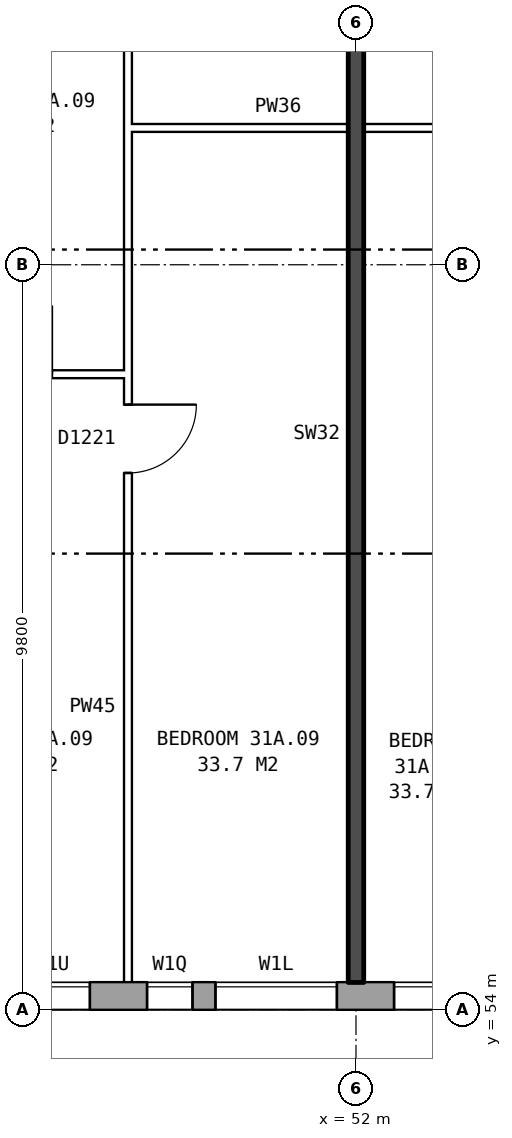
"""IFC4 building model, lengths in metres.
Left out: names, types, materials, properties, quantities, classifications, styles, units other than length and angle.
Written with IfcOpenShell. Run it as: python <this file> out.ifc"""

import sys

from ifc_helpers import new_model, si_unit, direction, frame, frame_2d, origin, place, context, subcontext, project, spatial, rectangle, extrude, element, fill, save


model = new_model("IFC4")
c1 = context("Model", 3, precision=1e-05, world=origin(), true_north=direction((0.0, 1.0)))
c2 = subcontext(c1, "Body", "Model", "MODEL_VIEW")
j1 = project(units=[si_unit("LENGTHUNIT", "METRE"), si_unit("PLANEANGLEUNIT", "RADIAN")], contexts=[c1])
p1 = place(None, origin())
s1 = spatial("IfcSite", under=j1, at=p1, CompositionType="ELEMENT")
p2 = place(p1, origin())
s2 = spatial("IfcBuilding", under=s1, at=p2, CompositionType="ELEMENT")
p3 = place(p2, frame((0.0, 0.0, 111.9)))
s3 = spatial("IfcBuildingStorey", under=s2, at=p3, CompositionType="ELEMENT", Elevation=111.9)
p4 = place(p3, frame((28.075, 54.18, 0.0), z_axis=(0.0, 0.0, 1.0), x_axis=(1.0, 0.0, 0.0)))
e1 = element("IfcWall", 1, at=p4, inside=s3, PredefinedType="STANDARD", context=c2, shape_type="SweptSolid", body=[
    extrude(rectangle(XDim=44.851, YDim=0.36, at=frame_2d((22.425, 0.0))), origin(), (0.0, 0.0, 1.0), 2.85),
])
p5 = place(p4, frame((0.625, 0.0, 0.8)))
e2 = element("IfcOpeningElement", 2, at=p5, cuts=e1, PredefinedType="OPENING", context=c2, shape_type="SweptSolid", body=[
    extrude(rectangle(XDim=1.6, YDim=1.8, at=frame_2d((0.8, 0.9))), frame((0.0, 0.19, 0.0), z_axis=(0.0, -1.0, 0.0), x_axis=(1.0, 0.0, 0.0)), (0.0, 0.0, 1.0), 0.38),
])
p6 = place(p4, frame((3.625, 0.0, 0.8)))
e3 = element("IfcOpeningElement", 3, at=p6, cuts=e1, PredefinedType="OPENING", context=c2, shape_type="SweptSolid", body=[
    extrude(rectangle(XDim=1.6, YDim=1.8, at=frame_2d((0.8, 0.9))), frame((0.0, 0.19, 0.0), z_axis=(0.0, -1.0, 0.0), x_axis=(1.0, 0.0, 0.0)), (0.0, 0.0, 1.0), 0.38),
])
p7 = place(p4, frame((6.625, 0.0, 0.8)))
e4 = element("IfcOpeningElement", 4, at=p7, cuts=e1, PredefinedType="OPENING", context=c2, shape_type="SweptSolid", body=[
    extrude(rectangle(XDim=1.6, YDim=1.8, at=frame_2d((0.8, 0.9))), frame((0.0, 0.19, 0.0), z_axis=(0.0, -1.0, 0.0), x_axis=(1.0, 0.0, 0.0)), (0.0, 0.0, 1.0), 0.38),
])
p8 = place(p4, frame((9.625, 0.0, 0.8)))
e5 = element("IfcOpeningElement", 5, at=p8, cuts=e1, PredefinedType="OPENING", context=c2, shape_type="SweptSolid", body=[
    extrude(rectangle(XDim=1.6, YDim=1.8, at=frame_2d((0.8, 0.9))), frame((0.0, 0.19, 0.0), z_axis=(0.0, -1.0, 0.0), x_axis=(1.0, 0.0, 0.0)), (0.0, 0.0, 1.0), 0.38),
])
p9 = place(p4, frame((12.625, 0.0, 0.8)))
e6 = element("IfcOpeningElement", 6, at=p9, cuts=e1, PredefinedType="OPENING", context=c2, shape_type="SweptSolid", body=[
    extrude(rectangle(XDim=1.6, YDim=1.8, at=frame_2d((0.8, 0.9))), frame((0.0, 0.19, 0.0), z_axis=(0.0, -1.0, 0.0), x_axis=(1.0, 0.0, 0.0)), (0.0, 0.0, 1.0), 0.38),
])
p10 = place(p4, frame((15.625, 0.0, 0.8)))
e7 = element("IfcOpeningElement", 7, at=p10, cuts=e1, PredefinedType="OPENING", context=c2, shape_type="SweptSolid", body=[
    extrude(rectangle(XDim=1.6, YDim=1.8, at=frame_2d((0.8, 0.9))), frame((0.0, 0.19, 0.0), z_axis=(0.0, -1.0, 0.0), x_axis=(1.0, 0.0, 0.0)), (0.0, 0.0, 1.0), 0.38),
])
p11 = place(p4, frame((18.125, 0.0, 0.8)))
e8 = element("IfcOpeningElement", 8, at=p11, cuts=e1, PredefinedType="OPENING", context=c2, shape_type="SweptSolid", body=[
    extrude(rectangle(XDim=1.0, YDim=1.8, at=frame_2d((0.5, 0.9))), frame((0.0, 0.19, 0.0), z_axis=(0.0, -1.0, 0.0), x_axis=(1.0, 0.0, 0.0)), (0.0, 0.0, 1.0), 0.38),
])
p12 = place(p4, frame((21.175, 0.0, 0.15)))
e9 = element("IfcOpeningElement", 9, at=p12, cuts=e1, PredefinedType="OPENING", context=c2, shape_type="SweptSolid", body=[
    extrude(rectangle(XDim=0.6, YDim=1.2, at=frame_2d((0.3, 0.6))), frame((0.0, 0.19, 0.0), z_axis=(0.0, -1.0, 0.0), x_axis=(1.0, 0.0, 0.0)), (0.0, 0.0, 1.0), 0.38),
])
p13 = place(p4, frame((24.425, 0.0, 1.7)))
e10 = element("IfcOpeningElement", 10, at=p13, cuts=e1, PredefinedType="OPENING", context=c2, shape_type="SweptSolid", body=[
    extrude(rectangle(XDim=1.0, YDim=0.9, at=frame_2d((0.5, 0.45))), frame((0.0, 0.19, 0.0), z_axis=(0.0, -1.0, 0.0), x_axis=(1.0, 0.0, 0.0)), (0.0, 0.0, 1.0), 0.38),
])
p14 = place(p4, frame((27.625, 0.0, 0.8)))
e11 = element("IfcOpeningElement", 11, at=p14, cuts=e1, PredefinedType="OPENING", context=c2, shape_type="SweptSolid", body=[
    extrude(rectangle(XDim=1.6, YDim=1.8, at=frame_2d((0.8, 0.9))), frame((0.0, 0.19, 0.0), z_axis=(0.0, -1.0, 0.0), x_axis=(1.0, 0.0, 0.0)), (0.0, 0.0, 1.0), 0.38),
])
p15 = place(p4, frame((30.625, 0.0, 0.8)))
e12 = element("IfcOpeningElement", 12, at=p15, cuts=e1, PredefinedType="OPENING", context=c2, shape_type="SweptSolid", body=[
    extrude(rectangle(XDim=1.6, YDim=1.8, at=frame_2d((0.8, 0.9))), frame((0.0, 0.19, 0.0), z_axis=(0.0, -1.0, 0.0), x_axis=(1.0, 0.0, 0.0)), (0.0, 0.0, 1.0), 0.38),
])
p16 = place(p4, frame((33.625, 0.0, 0.8)))
e13 = element("IfcOpeningElement", 13, at=p16, cuts=e1, PredefinedType="OPENING", context=c2, shape_type="SweptSolid", body=[
    extrude(rectangle(XDim=1.6, YDim=1.8, at=frame_2d((0.8, 0.9))), frame((0.0, 0.19, 0.0), z_axis=(0.0, -1.0, 0.0), x_axis=(1.0, 0.0, 0.0)), (0.0, 0.0, 1.0), 0.38),
])
p17 = place(p4, frame((36.625, 0.0, 0.8)))
e14 = element("IfcOpeningElement", 14, at=p17, cuts=e1, PredefinedType="OPENING", context=c2, shape_type="SweptSolid", body=[
    extrude(rectangle(XDim=1.6, YDim=1.8, at=frame_2d((0.8, 0.9))), frame((0.0, 0.19, 0.0), z_axis=(0.0, -1.0, 0.0), x_axis=(1.0, 0.0, 0.0)), (0.0, 0.0, 1.0), 0.38),
])
p18 = place(p4, frame((39.625, 0.0, 0.8)))
e15 = element("IfcOpeningElement", 15, at=p18, cuts=e1, PredefinedType="OPENING", context=c2, shape_type="SweptSolid", body=[
    extrude(rectangle(XDim=1.6, YDim=1.8, at=frame_2d((0.8, 0.9))), frame((0.0, 0.19, 0.0), z_axis=(0.0, -1.0, 0.0), x_axis=(1.0, 0.0, 0.0)), (0.0, 0.0, 1.0), 0.38),
])
p19 = place(p4, frame((42.625, 0.0, 0.8)))
e16 = element("IfcOpeningElement", 16, at=p19, cuts=e1, PredefinedType="OPENING", context=c2, shape_type="SweptSolid", body=[
    extrude(rectangle(XDim=1.6, YDim=1.8, at=frame_2d((0.8, 0.9))), frame((0.0, 0.19, 0.0), z_axis=(0.0, -1.0, 0.0), x_axis=(1.0, 0.0, 0.0)), (0.0, 0.0, 1.0), 0.38),
])
p20 = place(p4, frame((19.425, 0.0, 1.7)))
e17 = element("IfcOpeningElement", 17, at=p20, cuts=e1, PredefinedType="OPENING", context=c2, shape_type="SweptSolid", body=[
    extrude(rectangle(XDim=1.0, YDim=0.9, at=frame_2d((0.5, 0.45))), frame((0.0, 0.19, 0.0), z_axis=(0.0, -1.0, 0.0), x_axis=(1.0, 0.0, 0.0)), (0.0, 0.0, 1.0), 0.38),
])
p21 = place(p4, frame((22.075, 0.0, 0.15)))
e18 = element("IfcOpeningElement", 18, at=p21, cuts=e1, PredefinedType="OPENING", context=c2, shape_type="SweptSolid", body=[
    extrude(rectangle(XDim=1.6, YDim=1.2, at=frame_2d((0.8, 0.6))), frame((0.0, 0.19, 0.0), z_axis=(0.0, -1.0, 0.0), x_axis=(1.0, 0.0, 0.0)), (0.0, 0.0, 1.0), 0.38),
])
p22 = place(p4, frame((25.725, 0.0, 0.8)))
e19 = element("IfcOpeningElement", 19, at=p22, cuts=e1, PredefinedType="OPENING", context=c2, shape_type="SweptSolid", body=[
    extrude(rectangle(XDim=1.0, YDim=1.8, at=frame_2d((0.5, 0.9))), frame((0.0, 0.19, 0.0), z_axis=(0.0, -1.0, 0.0), x_axis=(1.0, 0.0, 0.0)), (0.0, 0.0, 1.0), 0.38),
])
p23 = place(p3, frame((46.1, 62.36, 0.0), z_axis=(0.0, 0.0, 1.0), x_axis=(1.0, 0.0, 0.0)))
e20 = element("IfcWall", 20, at=p23, inside=s3, PredefinedType="PARTITIONING", context=c2, shape_type="SweptSolid", body=[
    extrude(rectangle(XDim=2.9, YDim=0.1, at=frame_2d((1.45, 0.0))), origin(), (0.0, 0.0, 1.0), 2.85),
])
p24 = place(p23, frame((1.0, 0.0, 0.0)))
e21 = element("IfcOpeningElement", 21, at=p24, cuts=e20, PredefinedType="OPENING", context=c2, shape_type="SweptSolid", body=[
    extrude(rectangle(XDim=0.9, YDim=2.1, at=frame_2d((0.45, 1.05))), frame((0.0, 0.06, 0.0), z_axis=(0.0, -1.0, 0.0), x_axis=(1.0, 0.0, 0.0)), (0.0, 0.0, 1.0), 0.12),
])
p25 = place(p3, frame((49.0, 65.6, 0.0), z_axis=(0.0, 0.0, 1.0), x_axis=(1.0, 0.0, 0.0)))
e22 = element("IfcWall", 22, at=p25, inside=s3, PredefinedType="PARTITIONING", context=c2, shape_type="SweptSolid", body=[
    extrude(rectangle(XDim=6.0, YDim=0.1, at=frame_2d((3.0, 0.0))), origin(), (0.0, 0.0, 1.0), 2.85),
])
p26 = place(p3, frame((49.0, 54.36, 0.0), z_axis=(0.0, 0.0, 1.0), x_axis=(0.0, 1.0, 0.0)))
e23 = element("IfcWall", 23, at=p26, inside=s3, PredefinedType="PARTITIONING", context=c2, shape_type="SweptSolid", body=[
    extrude(rectangle(XDim=14.34, YDim=0.1, at=frame_2d((7.17, 0.0))), origin(), (0.0, 0.0, 1.0), 2.85),
])
p27 = place(p26, frame((6.7, 0.0, 0.0)))
e24 = element("IfcOpeningElement", 24, at=p27, cuts=e23, PredefinedType="OPENING", context=c2, shape_type="SweptSolid", body=[
    extrude(rectangle(XDim=0.9, YDim=2.1, at=frame_2d((0.45, 1.05))), frame((0.0, 0.06, 0.0), z_axis=(0.0, -1.0, 0.0), x_axis=(1.0, 0.0, 0.0)), (0.0, 0.0, 1.0), 0.12),
])
p28 = place(p26, frame((13.04, 0.0, 0.0)))
e25 = element("IfcOpeningElement", 25, at=p28, cuts=e23, PredefinedType="OPENING", context=c2, shape_type="SweptSolid", body=[
    extrude(rectangle(XDim=0.9, YDim=2.1, at=frame_2d((0.45, 1.05))), frame((0.0, 0.06, 0.0), z_axis=(0.0, -1.0, 0.0), x_axis=(1.0, 0.0, 0.0)), (0.0, 0.0, 1.0), 0.12),
])
p29 = place(p3, frame((52.0, 54.36, 0.0), z_axis=(0.0, 0.0, 1.0), x_axis=(0.0, 1.0, 0.0)))
e26 = element("IfcWall", 26, at=p29, inside=s3, PredefinedType="SOLIDWALL", context=c2, shape_type="SweptSolid", body=[
    extrude(rectangle(XDim=14.44, YDim=0.2, at=frame_2d((7.22, 0.0))), origin(), (0.0, 0.0, 1.0), 2.85),
])
p30 = place(p12, origin())
e27 = element("IfcWindow", 27, at=p30, inside=s3, PartitioningType="SINGLE_PANEL", PredefinedType="WINDOW", context=c2, shape_type="SweptSolid", body=[
    extrude(rectangle(XDim=0.6, YDim=1.2, at=frame_2d((0.3, 0.6))), frame((0.0, 0.15, 0.0), z_axis=(0.0, -1.0, 0.0), x_axis=(1.0, 0.0, 0.0)), (0.0, 0.0, 1.0), 0.06),
])
fill(e9, e27)
p31 = place(p13, origin())
e28 = element("IfcWindow", 28, at=p31, inside=s3, PartitioningType="SINGLE_PANEL", PredefinedType="WINDOW", context=c2, shape_type="SweptSolid", body=[
    extrude(rectangle(XDim=1.0, YDim=0.9, at=frame_2d((0.5, 0.45))), frame((0.0, 0.15, 0.0), z_axis=(0.0, -1.0, 0.0), x_axis=(1.0, 0.0, 0.0)), (0.0, 0.0, 1.0), 0.06),
])
fill(e10, e28)
p32 = place(p27, frame((0.9, 0.0, 0.0), z_axis=(0.0, 0.0, 1.0), x_axis=(-1.0, 0.0, 0.0)))
e29 = element("IfcDoor", 29, at=p32, inside=s3, OperationType="SINGLE_SWING_LEFT", PredefinedType="DOOR", context=c2, shape_type="SweptSolid", body=[
    extrude(rectangle(XDim=0.9, YDim=2.1, at=frame_2d((0.45, 1.05))), frame((0.0, 0.025, 0.0), z_axis=(0.0, -1.0, 0.0), x_axis=(1.0, 0.0, 0.0)), (0.0, 0.0, 1.0), 0.05),
])
fill(e24, e29)
p33 = place(p20, origin())
e30 = element("IfcWindow", 30, at=p33, inside=s3, PartitioningType="SINGLE_PANEL", PredefinedType="WINDOW", context=c2, shape_type="SweptSolid", body=[
    extrude(rectangle(XDim=1.0, YDim=0.9, at=frame_2d((0.5, 0.45))), frame((0.0, 0.15, 0.0), z_axis=(0.0, -1.0, 0.0), x_axis=(1.0, 0.0, 0.0)), (0.0, 0.0, 1.0), 0.06),
])
fill(e17, e30)
p34 = place(p21, origin())
e31 = element("IfcWindow", 31, at=p34, inside=s3, PartitioningType="SINGLE_PANEL", PredefinedType="WINDOW", context=c2, shape_type="SweptSolid", body=[
    extrude(rectangle(XDim=1.6, YDim=1.2, at=frame_2d((0.8, 0.6))), frame((0.0, 0.15, 0.0), z_axis=(0.0, -1.0, 0.0), x_axis=(1.0, 0.0, 0.0)), (0.0, 0.0, 1.0), 0.06),
])
fill(e18, e31)
save(model, sys.argv[1])
